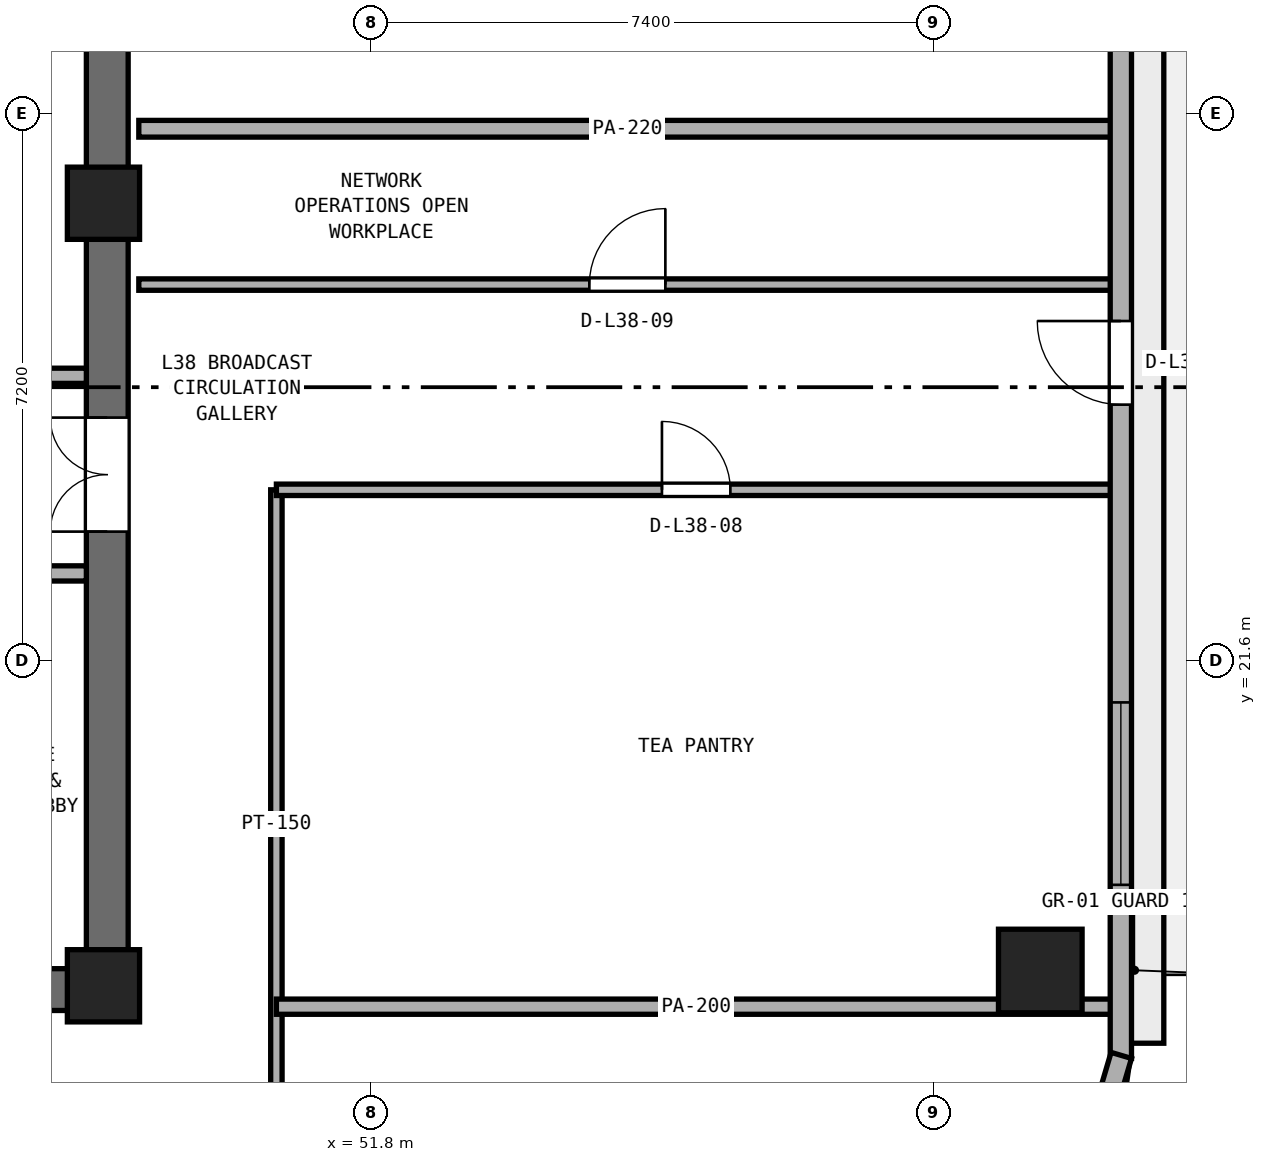
"""IFC4 building model, lengths in metres.
Left out: names, types, materials, properties, quantities, classifications, styles, units other than length and angle.
Written with IfcOpenShell. Run it as: python <this file> out.ifc"""

import sys

from ifc_helpers import new_model, si_unit, direction, frame, frame_2d, origin, origin_2d, place, context, subcontext, project, spatial, rectangle, extrude, element, fill, save


model = new_model("IFC4")
c1 = context("Model", 3, precision=1e-05, world=origin(), true_north=direction((0.0, 1.0)))
c2 = subcontext(c1, "Body", "Model", "MODEL_VIEW")
j1 = project(units=[si_unit("LENGTHUNIT", "METRE"), si_unit("PLANEANGLEUNIT", "RADIAN")], contexts=[c1])
p1 = place(None, origin())
s1 = spatial("IfcSite", under=j1, at=p1, CompositionType="ELEMENT")
p2 = place(p1, origin())
s2 = spatial("IfcBuilding", under=s1, at=p2, CompositionType="ELEMENT")
p3 = place(p2, frame((0.0, 0.0, 151.6)))
s3 = spatial("IfcBuildingStorey", under=s2, at=p3, CompositionType="ELEMENT", Elevation=151.6)
p4 = place(p3, frame((25.4, 17.275, 0.0), z_axis=(0.0, 0.0, 1.0), x_axis=(1.0, 0.0, 0.0)))
e1 = element("IfcWall", 1, at=p4, inside=s3, PredefinedType="SHEAR", context=c2, shape_type="SweptSolid", body=[
    extrude(rectangle(XDim=23.2, YDim=0.55, at=frame_2d((11.6, 0.0))), origin(), (0.0, 0.0, 1.0), 3.54),
])
p5 = place(p3, frame((48.325, 17.55, 0.0), z_axis=(0.0, 0.0, 1.0), x_axis=(0.0, 1.0, 0.0)))
e2 = element("IfcWall", 2, at=p5, inside=s3, PredefinedType="SHEAR", context=c2, shape_type="SweptSolid", body=[
    extrude(rectangle(XDim=15.3, YDim=0.55, at=frame_2d((7.65, 0.0))), origin(), (0.0, 0.0, 1.0), 3.54),
])
p6 = place(p5, frame((5.75, 0.0, 0.0)))
e3 = element("IfcOpeningElement", 3, at=p6, cuts=e2, PredefinedType="OPENING", context=c2, shape_type="SweptSolid", body=[
    extrude(rectangle(XDim=1.5, YDim=2.15, at=frame_2d((0.75, 1.075))), frame((0.0, 0.285, 0.0), z_axis=(0.0, -1.0, 0.0), x_axis=(1.0, 0.0, 0.0)), (0.0, 0.0, 1.0), 0.57),
])
for number, where, z_axis, x_axis in (
    (4, (48.275, 17.325, 0.0), (0.0, 0.0, 1.0), (1.0, 0.0, 0.0)),
    (5, (48.275, 27.62, 0.0), (0.0, 0.0, 1.0), (1.0, 0.0, 0.0)),
):
    element("IfcColumn", number, at=place(p3, frame(where, z_axis=z_axis, x_axis=x_axis)), inside=s3, PredefinedType="PILASTER", context=c2, shape_type="SweptSolid", body=[
        extrude(rectangle(XDim=0.95, YDim=0.95, at=origin_2d()), origin(), (0.0, 0.0, 1.0), 3.8),
    ])
p7 = place(p3, frame((60.6, 17.519, 0.0), z_axis=(0.0, 0.0, 1.0), x_axis=(1.0, 0.0, 0.0)))
e6 = element("IfcColumn", 6, at=p7, inside=s3, PredefinedType="COLUMN", context=c2, shape_type="SweptSolid", body=[
    extrude(rectangle(XDim=1.1, YDim=1.1, at=origin_2d()), origin(), (0.0, 0.0, 1.0), 3.8),
])
p8 = place(p3, frame((42.0, 22.75, 0.0), z_axis=(0.0, 0.0, 1.0), x_axis=(1.0, 0.0, 0.0)))
e7 = element("IfcWall", 7, at=p8, inside=s3, PredefinedType="SOLIDWALL", context=c2, shape_type="SweptSolid", body=[
    extrude(rectangle(XDim=6.05, YDim=0.2, at=frame_2d((3.025, 0.0))), origin(), (0.0, 0.0, 1.0), 3.54),
])
p9 = place(p3, frame((46.1, 25.35, 0.0), z_axis=(0.0, 0.0, 1.0), x_axis=(1.0, 0.0, 0.0)))
e8 = element("IfcWall", 8, at=p9, inside=s3, PredefinedType="SOLIDWALL", context=c2, shape_type="SweptSolid", body=[
    extrude(rectangle(XDim=1.95, YDim=0.2, at=frame_2d((0.975, 0.0))), origin(), (0.0, 0.0, 1.0), 3.54),
])
p10 = place(p3, frame((50.55, 15.05, 0.0), z_axis=(0.0, 0.0, 1.0), x_axis=(0.0, 1.0, 0.0)))
e9 = element("IfcWall", 9, at=p10, inside=s3, PredefinedType="PARTITIONING", context=c2, shape_type="SweptSolid", body=[
    extrude(rectangle(XDim=8.8, YDim=0.15, at=frame_2d((4.4, 0.0))), origin(), (0.0, 0.0, 1.0), 3.54),
])
p11 = place(p3, frame((50.55, 17.05, 0.0), z_axis=(0.0, 0.0, 1.0), x_axis=(1.0, 0.0, 0.0)))
e10 = element("IfcWall", 10, at=p11, inside=s3, PredefinedType="PARTITIONING", context=c2, shape_type="SweptSolid", body=[
    extrude(rectangle(XDim=11.045, YDim=0.2, at=frame_2d((5.522, 0.0))), origin(), (0.0, 0.0, 1.0), 3.54),
])
p12 = place(p3, frame((50.55, 23.85, 0.0), z_axis=(0.0, 0.0, 1.0), x_axis=(1.0, 0.0, 0.0)))
e11 = element("IfcWall", 11, at=p12, inside=s3, PredefinedType="PARTITIONING", context=c2, shape_type="SweptSolid", body=[
    extrude(rectangle(XDim=11.045, YDim=0.15, at=frame_2d((5.522, 0.0))), origin(), (0.0, 0.0, 1.0), 3.54),
])
p13 = place(p12, frame((5.073, 0.0, 0.0)))
e12 = element("IfcOpeningElement", 12, at=p13, cuts=e11, PredefinedType="OPENING", context=c2, shape_type="SweptSolid", body=[
    extrude(rectangle(XDim=0.9, YDim=2.1, at=frame_2d((0.45, 1.05))), frame((0.0, 0.085, 0.0), z_axis=(0.0, -1.0, 0.0), x_axis=(1.0, 0.0, 0.0)), (0.0, 0.0, 1.0), 0.17),
])
p14 = place(p3, frame((48.74, 26.55, 0.0), z_axis=(0.0, 0.0, 1.0), x_axis=(1.0, 0.0, 0.0)))
e13 = element("IfcWall", 13, at=p14, inside=s3, PredefinedType="PARTITIONING", context=c2, shape_type="SweptSolid", body=[
    extrude(rectangle(XDim=12.855, YDim=0.15, at=frame_2d((6.427, 0.0))), origin(), (0.0, 0.0, 1.0), 3.54),
])
p15 = place(p14, frame((5.927, 0.0, 0.0)))
e14 = element("IfcOpeningElement", 14, at=p15, cuts=e13, PredefinedType="OPENING", context=c2, shape_type="SweptSolid", body=[
    extrude(rectangle(XDim=1.0, YDim=2.12, at=frame_2d((0.5, 1.06))), frame((0.0, 0.085, 0.0), z_axis=(0.0, -1.0, 0.0), x_axis=(1.0, 0.0, 0.0)), (0.0, 0.0, 1.0), 0.17),
])
p16 = place(p3, frame((48.74, 28.6, 0.0), z_axis=(0.0, 0.0, 1.0), x_axis=(1.0, 0.0, 0.0)))
e15 = element("IfcWall", 15, at=p16, inside=s3, PredefinedType="PARTITIONING", context=c2, shape_type="SweptSolid", body=[
    extrude(rectangle(XDim=12.855, YDim=0.22, at=frame_2d((6.427, 0.0))), origin(), (0.0, 0.0, 1.0), 3.54),
])
p17 = place(p3, frame((61.66, 16.369, 0.0), z_axis=(0.0, 0.0, 1.0), x_axis=(0.0, 1.0, 0.0)))
e16 = element("IfcWall", 16, at=p17, inside=s3, PredefinedType="STANDARD", context=c2, shape_type="SweptSolid", body=[
    extrude(rectangle(XDim=18.902, YDim=0.28, at=frame_2d((9.451, 0.0))), origin(), (0.0, 0.0, 1.0), 3.54),
])
p18 = place(p17, frame((8.601, 0.0, 0.0)))
e17 = element("IfcOpeningElement", 17, at=p18, cuts=e16, PredefinedType="OPENING", context=c2, shape_type="SweptSolid", body=[
    extrude(rectangle(XDim=1.1, YDim=2.2, at=frame_2d((0.55, 1.1))), frame((0.0, 0.15, 0.0), z_axis=(0.0, -1.0, 0.0), x_axis=(1.0, 0.0, 0.0)), (0.0, 0.0, 1.0), 0.3),
])
p19 = place(p17, frame((2.284, 0.0, 0.9)))
e18 = element("IfcOpeningElement", 18, at=p19, cuts=e16, PredefinedType="OPENING", context=c2, shape_type="SweptSolid", body=[
    extrude(rectangle(XDim=2.4, YDim=1.75, at=frame_2d((1.2, 0.875))), frame((0.0, 0.15, 0.0), z_axis=(0.0, -1.0, 0.0), x_axis=(1.0, 0.0, 0.0)), (0.0, 0.0, 1.0), 0.3),
])
p20 = place(p17, frame((14.219, 0.0, 0.9)))
e19 = element("IfcOpeningElement", 19, at=p20, cuts=e16, PredefinedType="OPENING", context=c2, shape_type="SweptSolid", body=[
    extrude(rectangle(XDim=2.4, YDim=1.75, at=frame_2d((1.2, 0.875))), frame((0.0, 0.15, 0.0), z_axis=(0.0, -1.0, 0.0), x_axis=(1.0, 0.0, 0.0)), (0.0, 0.0, 1.0), 0.3),
])
p21 = place(p3, frame((61.086, 14.45, 0.0), z_axis=(0.0, 0.0, 1.0), x_axis=(0.283660953453, 0.958924639107, 0.0)))
e20 = element("IfcWall", 20, at=p21, inside=s3, PredefinedType="STANDARD", context=c2, shape_type="SweptSolid", body=[
    extrude(rectangle(XDim=2.042, YDim=0.28, at=frame_2d((1.021, 0.0))), origin(), (0.0, 0.0, 1.0), 3.54),
])
p22 = place(p6, origin())
e21 = element("IfcDoor", 21, at=p22, inside=s3, OperationType="DOUBLE_DOOR_SINGLE_SWING", PredefinedType="DOOR", context=c2, shape_type="SweptSolid", body=[
    extrude(rectangle(XDim=1.5, YDim=2.15, at=frame_2d((0.75, 1.075))), frame((0.0, 0.025, 0.0), z_axis=(0.0, -1.0, 0.0), x_axis=(1.0, 0.0, 0.0)), (0.0, 0.0, 1.0), 0.05),
])
fill(e3, e21)
p23 = place(p13, origin())
e22 = element("IfcDoor", 22, at=p23, inside=s3, OperationType="SINGLE_SWING_LEFT", PredefinedType="DOOR", context=c2, shape_type="SweptSolid", body=[
    extrude(rectangle(XDim=0.9, YDim=2.1, at=frame_2d((0.45, 1.05))), frame((0.0, 0.025, 0.0), z_axis=(0.0, -1.0, 0.0), x_axis=(1.0, 0.0, 0.0)), (0.0, 0.0, 1.0), 0.05),
])
fill(e12, e22)
p24 = place(p15, origin())
e23 = element("IfcDoor", 23, at=p24, inside=s3, OperationType="SINGLE_SWING_RIGHT", PredefinedType="DOOR", context=c2, shape_type="SweptSolid", body=[
    extrude(rectangle(XDim=1.0, YDim=2.12, at=frame_2d((0.5, 1.06))), frame((0.0, 0.025, 0.0), z_axis=(0.0, -1.0, 0.0), x_axis=(1.0, 0.0, 0.0)), (0.0, 0.0, 1.0), 0.05),
])
fill(e14, e23)
p25 = place(p18, origin())
e24 = element("IfcDoor", 24, at=p25, inside=s3, OperationType="SINGLE_SWING_RIGHT", PredefinedType="DOOR", context=c2, shape_type="SweptSolid", body=[
    extrude(rectangle(XDim=1.1, YDim=2.2, at=frame_2d((0.55, 1.1))), frame((0.0, 0.025, 0.0), z_axis=(0.0, -1.0, 0.0), x_axis=(1.0, 0.0, 0.0)), (0.0, 0.0, 1.0), 0.05),
])
fill(e17, e24)
p26 = place(p19, origin())
e25 = element("IfcWindow", 25, at=p26, inside=s3, PartitioningType="SINGLE_PANEL", PredefinedType="WINDOW", context=c2, shape_type="SweptSolid", body=[
    extrude(rectangle(XDim=2.4, YDim=1.75, at=frame_2d((1.2, 0.875))), frame((0.0, 0.03, 0.0), z_axis=(0.0, -1.0, 0.0), x_axis=(1.0, 0.0, 0.0)), (0.0, 0.0, 1.0), 0.06),
])
fill(e18, e25)
save(model, sys.argv[1])
